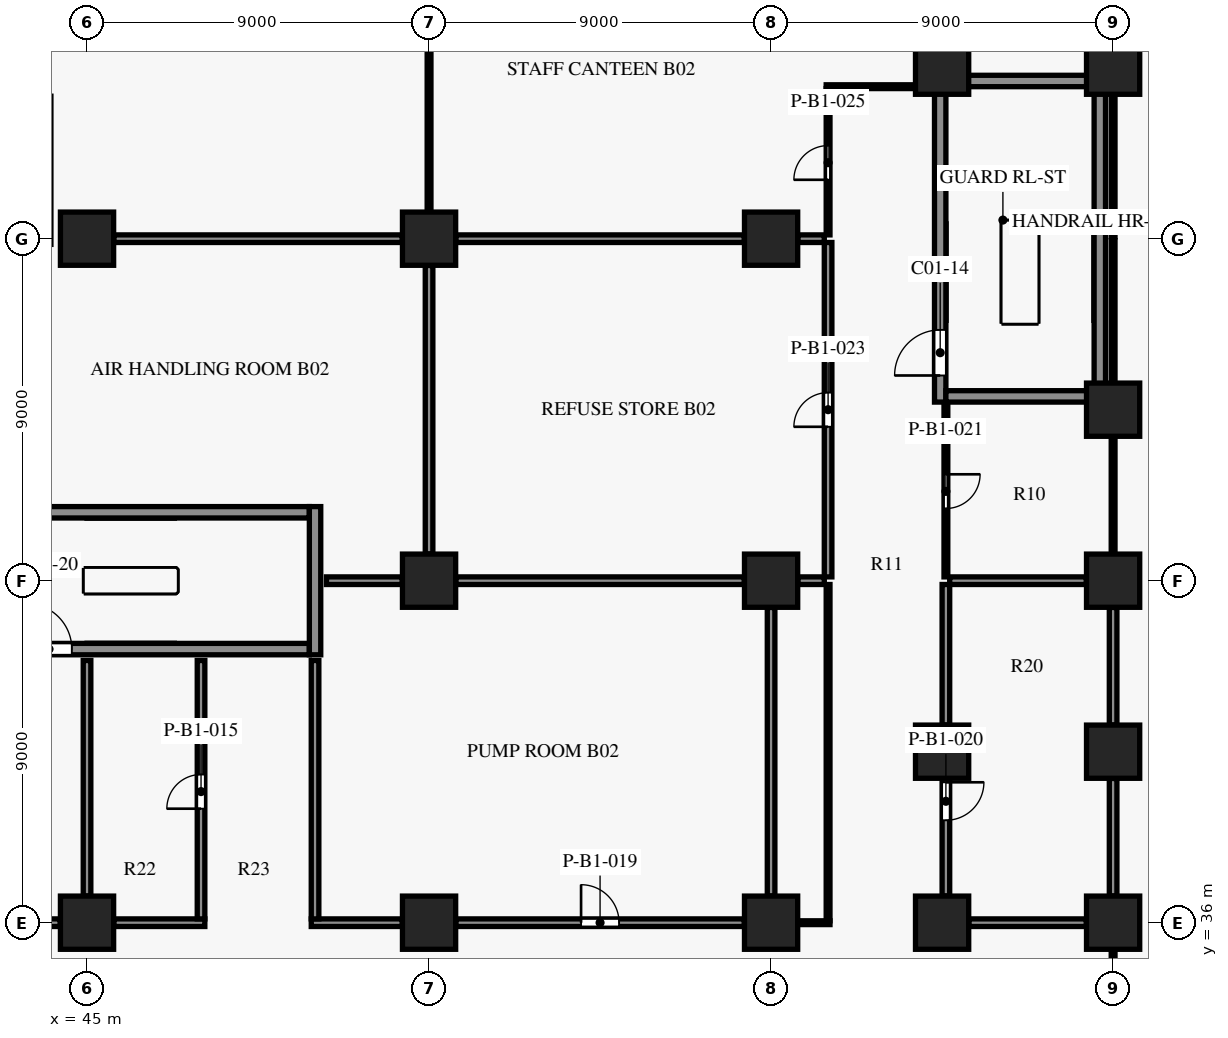
"""IFC4 building model, lengths in metres.
Left out: names, types, materials, properties, quantities, classifications, styles, units other than length and angle.
Written with IfcOpenShell. Run it as: python <this file> out.ifc"""

import sys

from ifc_helpers import new_model, si_unit, direction, frame, frame_2d, origin, origin_2d, place, context, subcontext, project, spatial, rectangle, extrude, element, fill, save


model = new_model("IFC4")
c1 = context("Model", 3, precision=1e-05, world=origin(), true_north=direction((0.0, 1.0)))
c2 = subcontext(c1, "Body", "Model", "MODEL_VIEW")
j1 = project(units=[si_unit("LENGTHUNIT", "METRE"), si_unit("PLANEANGLEUNIT", "RADIAN")], contexts=[c1])
p1 = place(None, origin())
s1 = spatial("IfcSite", under=j1, at=p1, CompositionType="ELEMENT")
p2 = place(p1, origin())
s2 = spatial("IfcBuilding", under=s1, at=p2, CompositionType="ELEMENT")
p3 = place(p2, frame((0.0, 0.0, -6.0)))
s3 = spatial("IfcBuildingStorey", under=s2, at=p3, CompositionType="ELEMENT", Elevation=-6.0)
for number, where, z_axis, x_axis in (
    (1, (45.0, 36.0, 0.0), (0.0, 0.0, 1.0), (1.0, 0.0, 0.0)),
    (2, (54.0, 36.0, 0.0), (0.0, 0.0, 1.0), (1.0, 0.0, 0.0)),
    (3, (63.0, 36.0, 0.0), (0.0, 0.0, 1.0), (1.0, 0.0, 0.0)),
    (4, (67.5, 36.0, 0.0), (0.0, 0.0, 1.0), (1.0, 0.0, 0.0)),
    (5, (72.0, 40.5, 0.0), (0.0, 0.0, 1.0), (1.0, 0.0, 0.0)),
    (6, (72.0, 49.5, 0.0), (0.0, 0.0, 1.0), (1.0, 0.0, 0.0)),
    (7, (72.0, 58.5, 0.0), (0.0, 0.0, 1.0), (1.0, 0.0, 0.0)),
    (8, (67.5, 40.5, 0.0), (0.0, 0.0, 1.0), (1.0, 0.0, 0.0)),
    (9, (67.5, 58.5, 0.0), (0.0, 0.0, 1.0), (1.0, 0.0, 0.0)),
    (10, (45.0, 54.0, 0.0), (0.0, 0.0, 1.0), (1.0, 0.0, 0.0)),
    (11, (54.0, 45.0, 0.0), (0.0, 0.0, 1.0), (1.0, 0.0, 0.0)),
    (12, (54.0, 54.0, 0.0), (0.0, 0.0, 1.0), (1.0, 0.0, 0.0)),
    (13, (63.0, 45.0, 0.0), (0.0, 0.0, 1.0), (1.0, 0.0, 0.0)),
    (14, (63.0, 54.0, 0.0), (0.0, 0.0, 1.0), (1.0, 0.0, 0.0)),
    (15, (72.0, 36.0, 0.0), (0.0, 0.0, 1.0), (1.0, 0.0, 0.0)),
    (16, (72.0, 45.0, 0.0), (0.0, 0.0, 1.0), (1.0, 0.0, 0.0)),
):
    element("IfcColumn", number, at=place(p3, frame(where, z_axis=z_axis, x_axis=x_axis)), inside=s3, PredefinedType="COLUMN", context=c2, shape_type="SweptSolid", body=[
        extrude(rectangle(XDim=1.4, YDim=1.4, at=origin_2d()), origin(), (0.0, 0.0, 1.0), 6.0),
    ])
p4 = place(p3, frame((43.15, 43.2, 0.0), z_axis=(0.0, 0.0, 1.0), x_axis=(1.0, 0.0, 0.0)))
e17 = element("IfcWall", 17, at=p4, inside=s3, PredefinedType="SHEAR", context=c2, shape_type="SweptSolid", body=[
    extrude(rectangle(XDim=7.7, YDim=0.3, at=frame_2d((3.85, 0.0))), origin(), (0.0, 0.0, 1.0), 5.6),
])
p5 = place(p4, frame((0.25, 0.0, 0.0)))
e18 = element("IfcOpeningElement", 18, at=p5, cuts=e17, PredefinedType="OPENING", context=c2, shape_type="SweptSolid", body=[
    extrude(rectangle(XDim=1.2, YDim=2.2, at=frame_2d((0.6, 1.1))), frame((0.0, 0.16, 0.0), z_axis=(0.0, -1.0, 0.0), x_axis=(1.0, 0.0, 0.0)), (0.0, 0.0, 1.0), 0.32),
])
p6 = place(p3, frame((43.15, 46.8, 0.0), z_axis=(0.0, 0.0, 1.0), x_axis=(1.0, 0.0, 0.0)))
e19 = element("IfcWall", 19, at=p6, inside=s3, PredefinedType="SHEAR", context=c2, shape_type="SweptSolid", body=[
    extrude(rectangle(XDim=7.7, YDim=0.3, at=frame_2d((3.85, 0.0))), origin(), (0.0, 0.0, 1.0), 5.6),
])
for number, where, z_axis, x_axis in (
    (20, (67.6, 49.85, 0.0), (0.0, 0.0, 1.0), (1.0, 0.0, 0.0)),
    (21, (67.6, 58.15, 0.0), (0.0, 0.0, 1.0), (1.0, 0.0, 0.0)),
    (22, (51.0, 43.05, 0.0), (0.0, 0.0, 1.0), (0.0, 1.0, 0.0)),
):
    element("IfcWall", number, at=place(p3, frame(where, z_axis=z_axis, x_axis=x_axis)), inside=s3, PredefinedType="SHEAR", context=c2, shape_type="SweptSolid", body=[
        extrude(rectangle(XDim=3.9, YDim=0.3, at=frame_2d((1.95, 0.0))), origin(), (0.0, 0.0, 1.0), 5.6),
    ])
p7 = place(p3, frame((67.45, 49.7, 0.0), z_axis=(0.0, 0.0, 1.0), x_axis=(0.0, 1.0, 0.0)))
e23 = element("IfcWall", 23, at=p7, inside=s3, PredefinedType="SHEAR", context=c2, shape_type="SweptSolid", body=[
    extrude(rectangle(XDim=8.6, YDim=0.3, at=frame_2d((4.3, 0.0))), origin(), (0.0, 0.0, 1.0), 5.6),
])
p8 = place(p7, frame((0.7, 0.0, 0.0)))
e24 = element("IfcOpeningElement", 24, at=p8, cuts=e23, PredefinedType="OPENING", context=c2, shape_type="SweptSolid", body=[
    extrude(rectangle(XDim=1.2, YDim=2.2, at=frame_2d((0.6, 1.1))), frame((0.0, 0.16, 0.0), z_axis=(0.0, -1.0, 0.0), x_axis=(1.0, 0.0, 0.0)), (0.0, 0.0, 1.0), 0.32),
])
p9 = place(p3, frame((71.65, 49.7, 0.0), z_axis=(0.0, 0.0, 1.0), x_axis=(0.0, 1.0, 0.0)))
e25 = element("IfcWall", 25, at=p9, inside=s3, PredefinedType="SHEAR", context=c2, shape_type="SweptSolid", body=[
    extrude(rectangle(XDim=8.6, YDim=0.3, at=frame_2d((4.3, 0.0))), origin(), (0.0, 0.0, 1.0), 5.6),
])
p10 = place(p3, frame((72.0, 35.295, 0.0), z_axis=(0.0, 0.0, 1.0), x_axis=(0.0, -1.0, 0.0)))
e26 = element("IfcWall", 26, at=p10, inside=s3, PredefinedType="PARTITIONING", context=c2, shape_type="SweptSolid", body=[
    extrude(rectangle(XDim=3.695, YDim=0.1, at=frame_2d((1.847, 0.0))), origin(), (0.0, 0.0, 1.0), 5.58),
])
for number, where, z_axis, x_axis in (
    (27, (41.9, 36.0, 0.0), (0.0, 0.0, 1.0), (1.0, 0.0, 0.0)),
    (28, (45.705, 36.0, 0.0), (0.0, 0.0, 1.0), (1.0, 0.0, 0.0)),
    (29, (50.9, 36.0, 0.0), (0.0, 0.0, 1.0), (1.0, 0.0, 0.0)),
):
    element("IfcWall", number, at=place(p3, frame(where, z_axis=z_axis, x_axis=x_axis)), inside=s3, PredefinedType="PARTITIONING", context=c2, shape_type="SweptSolid", body=[
        extrude(rectangle(XDim=2.395, YDim=0.2, at=frame_2d((1.198, 0.0))), origin(), (0.0, 0.0, 1.0), 5.58),
    ])
p11 = place(p3, frame((54.705, 36.0, 0.0), z_axis=(0.0, 0.0, 1.0), x_axis=(1.0, 0.0, 0.0)))
e30 = element("IfcWall", 30, at=p11, inside=s3, PredefinedType="PARTITIONING", context=c2, shape_type="SweptSolid", body=[
    extrude(rectangle(XDim=7.59, YDim=0.2, at=frame_2d((3.795, 0.0))), origin(), (0.0, 0.0, 1.0), 5.58),
])
p12 = place(p11, frame((3.295, 0.0, 0.0)))
e31 = element("IfcOpeningElement", 31, at=p12, cuts=e30, PredefinedType="OPENING", context=c2, shape_type="SweptSolid", body=[
    extrude(rectangle(XDim=1.0, YDim=2.1, at=frame_2d((0.5, 1.05))), frame((0.0, 0.11, 0.0), z_axis=(0.0, -1.0, 0.0), x_axis=(1.0, 0.0, 0.0)), (0.0, 0.0, 1.0), 0.22),
])
p13 = place(p3, frame((63.705, 36.0, 0.0), z_axis=(0.0, 0.0, 1.0), x_axis=(1.0, 0.0, 0.0)))
e32 = element("IfcWall", 32, at=p13, inside=s3, PredefinedType="PARTITIONING", context=c2, shape_type="SweptSolid", body=[
    extrude(rectangle(XDim=0.845, YDim=0.1, at=frame_2d((0.422, 0.0))), origin(), (0.0, 0.0, 1.0), 5.58),
])
p14 = place(p3, frame((68.205, 36.0, 0.0), z_axis=(0.0, 0.0, 1.0), x_axis=(1.0, 0.0, 0.0)))
e33 = element("IfcWall", 33, at=p14, inside=s3, PredefinedType="PARTITIONING", context=c2, shape_type="SweptSolid", body=[
    extrude(rectangle(XDim=3.09, YDim=0.2, at=frame_2d((1.545, 0.0))), origin(), (0.0, 0.0, 1.0), 5.58),
])
p15 = place(p3, frame((64.5, 36.05, 0.0), z_axis=(0.0, 0.0, 1.0), x_axis=(0.0, 1.0, 0.0)))
e34 = element("IfcWall", 34, at=p15, inside=s3, PredefinedType="PARTITIONING", context=c2, shape_type="SweptSolid", body=[
    extrude(rectangle(XDim=8.85, YDim=0.1, at=frame_2d((4.425, 0.0))), origin(), (0.0, 0.0, 1.0), 5.58),
])
p16 = place(p3, frame((48.0, 36.1, 0.0), z_axis=(0.0, 0.0, 1.0), x_axis=(0.0, 1.0, 0.0)))
e35 = element("IfcWall", 35, at=p16, inside=s3, PredefinedType="PARTITIONING", context=c2, shape_type="SweptSolid", body=[
    extrude(rectangle(XDim=6.8, YDim=0.2, at=frame_2d((3.4, 0.0))), origin(), (0.0, 0.0, 1.0), 5.58),
])
p17 = place(p16, frame((2.9, 0.0, 0.0)))
e36 = element("IfcOpeningElement", 36, at=p17, cuts=e35, PredefinedType="OPENING", context=c2, shape_type="SweptSolid", body=[
    extrude(rectangle(XDim=0.9, YDim=2.1, at=frame_2d((0.45, 1.05))), frame((0.0, 0.11, 0.0), z_axis=(0.0, -1.0, 0.0), x_axis=(1.0, 0.0, 0.0)), (0.0, 0.0, 1.0), 0.22),
])
p18 = place(p3, frame((45.0, 36.705, 0.0), z_axis=(0.0, 0.0, 1.0), x_axis=(0.0, 1.0, 0.0)))
e37 = element("IfcWall", 37, at=p18, inside=s3, PredefinedType="PARTITIONING", context=c2, shape_type="SweptSolid", body=[
    extrude(rectangle(XDim=6.195, YDim=0.2, at=frame_2d((3.097, 0.0))), origin(), (0.0, 0.0, 1.0), 5.58),
])
p19 = place(p3, frame((67.6, 39.795, 0.0), z_axis=(0.0, 0.0, 1.0), x_axis=(0.0, -1.0, 0.0)))
e38 = element("IfcWall", 38, at=p19, inside=s3, PredefinedType="PARTITIONING", context=c2, shape_type="SweptSolid", body=[
    extrude(rectangle(XDim=3.09, YDim=0.2, at=frame_2d((1.545, 0.0))), origin(), (0.0, 0.0, 1.0), 5.58),
])
p20 = place(p19, frame((0.1, 0.0, 0.0)))
e39 = element("IfcOpeningElement", 39, at=p20, cuts=e38, PredefinedType="OPENING", context=c2, shape_type="SweptSolid", body=[
    extrude(rectangle(XDim=1.0, YDim=2.1, at=frame_2d((0.5, 1.05))), frame((0.0, 0.11, 0.0), z_axis=(0.0, -1.0, 0.0), x_axis=(1.0, 0.0, 0.0)), (0.0, 0.0, 1.0), 0.22),
])
p21 = place(p3, frame((72.0, 39.795, 0.0), z_axis=(0.0, 0.0, 1.0), x_axis=(0.0, -1.0, 0.0)))
e40 = element("IfcWall", 40, at=p21, inside=s3, PredefinedType="PARTITIONING", context=c2, shape_type="SweptSolid", body=[
    extrude(rectangle(XDim=3.09, YDim=0.2, at=frame_2d((1.545, 0.0))), origin(), (0.0, 0.0, 1.0), 5.58),
])
p22 = place(p3, frame((51.0, 42.9, 0.0), z_axis=(0.0, 0.0, 1.0), x_axis=(0.0, -1.0, 0.0)))
e41 = element("IfcWall", 41, at=p22, inside=s3, PredefinedType="PARTITIONING", context=c2, shape_type="SweptSolid", body=[
    extrude(rectangle(XDim=6.8, YDim=0.2, at=frame_2d((3.4, 0.0))), origin(), (0.0, 0.0, 1.0), 5.58),
])
p23 = place(p3, frame((63.0, 44.295, 0.0), z_axis=(0.0, 0.0, 1.0), x_axis=(0.0, -1.0, 0.0)))
e42 = element("IfcWall", 42, at=p23, inside=s3, PredefinedType="PARTITIONING", context=c2, shape_type="SweptSolid", body=[
    extrude(rectangle(XDim=7.59, YDim=0.2, at=frame_2d((3.795, 0.0))), origin(), (0.0, 0.0, 1.0), 5.58),
])
p24 = place(p3, frame((72.0, 44.295, 0.0), z_axis=(0.0, 0.0, 1.0), x_axis=(0.0, -1.0, 0.0)))
e43 = element("IfcWall", 43, at=p24, inside=s3, PredefinedType="PARTITIONING", context=c2, shape_type="SweptSolid", body=[
    extrude(rectangle(XDim=3.09, YDim=0.2, at=frame_2d((1.545, 0.0))), origin(), (0.0, 0.0, 1.0), 5.58),
])
p25 = place(p3, frame((67.6, 44.9, 0.0), z_axis=(0.0, 0.0, 1.0), x_axis=(0.0, -1.0, 0.0)))
e44 = element("IfcWall", 44, at=p25, inside=s3, PredefinedType="PARTITIONING", context=c2, shape_type="SweptSolid", body=[
    extrude(rectangle(XDim=3.695, YDim=0.2, at=frame_2d((1.847, 0.0))), origin(), (0.0, 0.0, 1.0), 5.58),
])
p26 = place(p3, frame((51.3, 45.0, 0.0), z_axis=(0.0, 0.0, 1.0), x_axis=(1.0, 0.0, 0.0)))
e45 = element("IfcWall", 45, at=p26, inside=s3, PredefinedType="PARTITIONING", context=c2, shape_type="SweptSolid", body=[
    extrude(rectangle(XDim=1.995, YDim=0.2, at=frame_2d((0.998, 0.0))), origin(), (0.0, 0.0, 1.0), 5.58),
])
p27 = place(p3, frame((54.705, 45.0, 0.0), z_axis=(0.0, 0.0, 1.0), x_axis=(1.0, 0.0, 0.0)))
e46 = element("IfcWall", 46, at=p27, inside=s3, PredefinedType="PARTITIONING", context=c2, shape_type="SweptSolid", body=[
    extrude(rectangle(XDim=7.59, YDim=0.2, at=frame_2d((3.795, 0.0))), origin(), (0.0, 0.0, 1.0), 5.58),
])
p28 = place(p3, frame((64.4, 45.0, 0.0), z_axis=(0.0, 0.0, 1.0), x_axis=(-1.0, 0.0, 0.0)))
e47 = element("IfcWall", 47, at=p28, inside=s3, PredefinedType="PARTITIONING", context=c2, shape_type="SweptSolid", body=[
    extrude(rectangle(XDim=0.695, YDim=0.2, at=frame_2d((0.347, 0.0))), origin(), (0.0, 0.0, 1.0), 5.58),
])
p29 = place(p3, frame((67.7, 45.0, 0.0), z_axis=(0.0, 0.0, 1.0), x_axis=(1.0, 0.0, 0.0)))
e48 = element("IfcWall", 48, at=p29, inside=s3, PredefinedType="PARTITIONING", context=c2, shape_type="SweptSolid", body=[
    extrude(rectangle(XDim=3.595, YDim=0.2, at=frame_2d((1.797, 0.0))), origin(), (0.0, 0.0, 1.0), 5.58),
])
p30 = place(p3, frame((64.5, 45.1, 0.0), z_axis=(0.0, 0.0, 1.0), x_axis=(0.0, 1.0, 0.0)))
e49 = element("IfcWall", 49, at=p30, inside=s3, PredefinedType="PARTITIONING", context=c2, shape_type="SweptSolid", body=[
    extrude(rectangle(XDim=8.8, YDim=0.2, at=frame_2d((4.4, 0.0))), origin(), (0.0, 0.0, 1.0), 5.58),
])
p31 = place(p30, frame((3.95, 0.0, 0.0)))
e50 = element("IfcOpeningElement", 50, at=p31, cuts=e49, PredefinedType="OPENING", context=c2, shape_type="SweptSolid", body=[
    extrude(rectangle(XDim=0.9, YDim=2.1, at=frame_2d((0.45, 1.05))), frame((0.0, 0.11, 0.0), z_axis=(0.0, -1.0, 0.0), x_axis=(1.0, 0.0, 0.0)), (0.0, 0.0, 1.0), 0.22),
])
p32 = place(p3, frame((54.0, 45.705, 0.0), z_axis=(0.0, 0.0, 1.0), x_axis=(0.0, 1.0, 0.0)))
e51 = element("IfcWall", 51, at=p32, inside=s3, PredefinedType="PARTITIONING", context=c2, shape_type="SweptSolid", body=[
    extrude(rectangle(XDim=7.59, YDim=0.2, at=frame_2d((3.795, 0.0))), origin(), (0.0, 0.0, 1.0), 5.58),
])
p33 = place(p3, frame((72.0, 48.795, 0.0), z_axis=(0.0, 0.0, 1.0), x_axis=(0.0, -1.0, 0.0)))
e52 = element("IfcWall", 52, at=p33, inside=s3, PredefinedType="PARTITIONING", context=c2, shape_type="SweptSolid", body=[
    extrude(rectangle(XDim=3.09, YDim=0.1, at=frame_2d((1.545, 0.0))), origin(), (0.0, 0.0, 1.0), 5.58),
])
p34 = place(p3, frame((67.6, 49.7, 0.0), z_axis=(0.0, 0.0, 1.0), x_axis=(0.0, -1.0, 0.0)))
e53 = element("IfcWall", 53, at=p34, inside=s3, PredefinedType="PARTITIONING", context=c2, shape_type="SweptSolid", body=[
    extrude(rectangle(XDim=4.6, YDim=0.1, at=frame_2d((2.3, 0.0))), origin(), (0.0, 0.0, 1.0), 5.58),
])
p35 = place(p34, frame((1.9, 0.0, 0.0)))
e54 = element("IfcOpeningElement", 54, at=p35, cuts=e53, PredefinedType="OPENING", context=c2, shape_type="SweptSolid", body=[
    extrude(rectangle(XDim=0.9, YDim=2.1, at=frame_2d((0.45, 1.05))), frame((0.0, 0.06, 0.0), z_axis=(0.0, -1.0, 0.0), x_axis=(1.0, 0.0, 0.0)), (0.0, 0.0, 1.0), 0.12),
])
p36 = place(p3, frame((72.0, 53.95, 0.0), z_axis=(0.0, 0.0, 1.0), x_axis=(0.0, -1.0, 0.0)))
e55 = element("IfcWall", 55, at=p36, inside=s3, PredefinedType="PARTITIONING", context=c2, shape_type="SweptSolid", body=[
    extrude(rectangle(XDim=3.745, YDim=0.1, at=frame_2d((1.873, 0.0))), origin(), (0.0, 0.0, 1.0), 5.58),
])
for number, where, z_axis, x_axis in (
    (56, (45.705, 54.0, 0.0), (0.0, 0.0, 1.0), (1.0, 0.0, 0.0)),
    (57, (62.295, 54.0, 0.0), (0.0, 0.0, 1.0), (-1.0, 0.0, 0.0)),
):
    element("IfcWall", number, at=place(p3, frame(where, z_axis=z_axis, x_axis=x_axis)), inside=s3, PredefinedType="PARTITIONING", context=c2, shape_type="SweptSolid", body=[
        extrude(rectangle(XDim=7.59, YDim=0.2, at=frame_2d((3.795, 0.0))), origin(), (0.0, 0.0, 1.0), 5.58),
    ])
p37 = place(p3, frame((64.4, 54.0, 0.0), z_axis=(0.0, 0.0, 1.0), x_axis=(-1.0, 0.0, 0.0)))
e58 = element("IfcWall", 58, at=p37, inside=s3, PredefinedType="PARTITIONING", context=c2, shape_type="SweptSolid", body=[
    extrude(rectangle(XDim=0.695, YDim=0.2, at=frame_2d((0.347, 0.0))), origin(), (0.0, 0.0, 1.0), 5.58),
])
p38 = place(p3, frame((64.5, 54.1, 0.0), z_axis=(0.0, 0.0, 1.0), x_axis=(0.0, 1.0, 0.0)))
e59 = element("IfcWall", 59, at=p38, inside=s3, PredefinedType="PARTITIONING", context=c2, shape_type="SweptSolid", body=[
    extrude(rectangle(XDim=3.85, YDim=0.1, at=frame_2d((1.925, 0.0))), origin(), (0.0, 0.0, 1.0), 5.58),
])
p39 = place(p38, frame((1.45, 0.0, 0.0)))
e60 = element("IfcOpeningElement", 60, at=p39, cuts=e59, PredefinedType="OPENING", context=c2, shape_type="SweptSolid", body=[
    extrude(rectangle(XDim=0.9, YDim=2.1, at=frame_2d((0.45, 1.05))), frame((0.0, 0.06, 0.0), z_axis=(0.0, -1.0, 0.0), x_axis=(1.0, 0.0, 0.0)), (0.0, 0.0, 1.0), 0.12),
])
p40 = place(p3, frame((54.0, 54.705, 0.0), z_axis=(0.0, 0.0, 1.0), x_axis=(0.0, 1.0, 0.0)))
e61 = element("IfcWall", 61, at=p40, inside=s3, PredefinedType="PARTITIONING", context=c2, shape_type="SweptSolid", body=[
    extrude(rectangle(XDim=7.59, YDim=0.1, at=frame_2d((3.795, 0.0))), origin(), (0.0, 0.0, 1.0), 5.58),
])
p41 = place(p3, frame((72.0, 57.795, 0.0), z_axis=(0.0, 0.0, 1.0), x_axis=(0.0, -1.0, 0.0)))
e62 = element("IfcWall", 62, at=p41, inside=s3, PredefinedType="PARTITIONING", context=c2, shape_type="SweptSolid", body=[
    extrude(rectangle(XDim=3.745, YDim=0.1, at=frame_2d((1.873, 0.0))), origin(), (0.0, 0.0, 1.0), 5.58),
])
p42 = place(p3, frame((64.45, 58.0, 0.0), z_axis=(0.0, 0.0, 1.0), x_axis=(1.0, 0.0, 0.0)))
e63 = element("IfcWall", 63, at=p42, inside=s3, PredefinedType="PARTITIONING", context=c2, shape_type="SweptSolid", body=[
    extrude(rectangle(XDim=2.345, YDim=0.1, at=frame_2d((1.172, 0.0))), origin(), (0.0, 0.0, 1.0), 5.58),
])
p43 = place(p8, origin())
e64 = element("IfcDoor", 64, at=p43, inside=s3, OperationType="SINGLE_SWING_RIGHT", PredefinedType="DOOR", context=c2, shape_type="SweptSolid", body=[
    extrude(rectangle(XDim=1.2, YDim=2.2, at=frame_2d((0.6, 1.1))), frame((0.0, 0.025, 0.0), z_axis=(0.0, -1.0, 0.0), x_axis=(1.0, 0.0, 0.0)), (0.0, 0.0, 1.0), 0.05),
])
fill(e24, e64)
p44 = place(p5, origin())
e65 = element("IfcDoor", 65, at=p44, inside=s3, OperationType="SINGLE_SWING_RIGHT", PredefinedType="DOOR", context=c2, shape_type="SweptSolid", body=[
    extrude(rectangle(XDim=1.2, YDim=2.2, at=frame_2d((0.6, 1.1))), frame((0.0, 0.025, 0.0), z_axis=(0.0, -1.0, 0.0), x_axis=(1.0, 0.0, 0.0)), (0.0, 0.0, 1.0), 0.05),
])
fill(e18, e65)
p45 = place(p17, origin())
e66 = element("IfcDoor", 66, at=p45, inside=s3, OperationType="SINGLE_SWING_LEFT", PredefinedType="DOOR", context=c2, shape_type="SweptSolid", body=[
    extrude(rectangle(XDim=0.9, YDim=2.1, at=frame_2d((0.45, 1.05))), frame((0.0, 0.025, 0.0), z_axis=(0.0, -1.0, 0.0), x_axis=(1.0, 0.0, 0.0)), (0.0, 0.0, 1.0), 0.05),
])
fill(e36, e66)
p46 = place(p12, origin())
e67 = element("IfcDoor", 67, at=p46, inside=s3, OperationType="SINGLE_SWING_RIGHT", PredefinedType="DOOR", context=c2, shape_type="SweptSolid", body=[
    extrude(rectangle(XDim=1.0, YDim=2.1, at=frame_2d((0.5, 1.05))), frame((0.0, 0.025, 0.0), z_axis=(0.0, -1.0, 0.0), x_axis=(1.0, 0.0, 0.0)), (0.0, 0.0, 1.0), 0.05),
])
fill(e31, e67)
p47 = place(p20, origin())
e68 = element("IfcDoor", 68, at=p47, inside=s3, OperationType="SINGLE_SWING_RIGHT", PredefinedType="DOOR", context=c2, shape_type="SweptSolid", body=[
    extrude(rectangle(XDim=1.0, YDim=2.1, at=frame_2d((0.5, 1.05))), frame((0.0, 0.025, 0.0), z_axis=(0.0, -1.0, 0.0), x_axis=(1.0, 0.0, 0.0)), (0.0, 0.0, 1.0), 0.05),
])
fill(e39, e68)
p48 = place(p35, origin())
e69 = element("IfcDoor", 69, at=p48, inside=s3, OperationType="SINGLE_SWING_LEFT", PredefinedType="DOOR", context=c2, shape_type="SweptSolid", body=[
    extrude(rectangle(XDim=0.9, YDim=2.1, at=frame_2d((0.45, 1.05))), frame((0.0, 0.025, 0.0), z_axis=(0.0, -1.0, 0.0), x_axis=(1.0, 0.0, 0.0)), (0.0, 0.0, 1.0), 0.05),
])
fill(e54, e69)
p49 = place(p31, origin())
e70 = element("IfcDoor", 70, at=p49, inside=s3, OperationType="SINGLE_SWING_RIGHT", PredefinedType="DOOR", context=c2, shape_type="SweptSolid", body=[
    extrude(rectangle(XDim=0.9, YDim=2.1, at=frame_2d((0.45, 1.05))), frame((0.0, 0.025, 0.0), z_axis=(0.0, -1.0, 0.0), x_axis=(1.0, 0.0, 0.0)), (0.0, 0.0, 1.0), 0.05),
])
fill(e50, e70)
p50 = place(p39, origin())
e71 = element("IfcDoor", 71, at=p50, inside=s3, OperationType="SINGLE_SWING_LEFT", PredefinedType="DOOR", context=c2, shape_type="SweptSolid", body=[
    extrude(rectangle(XDim=0.9, YDim=2.1, at=frame_2d((0.45, 1.05))), frame((0.0, 0.025, 0.0), z_axis=(0.0, -1.0, 0.0), x_axis=(1.0, 0.0, 0.0)), (0.0, 0.0, 1.0), 0.05),
])
fill(e60, e71)
save(model, sys.argv[1])
